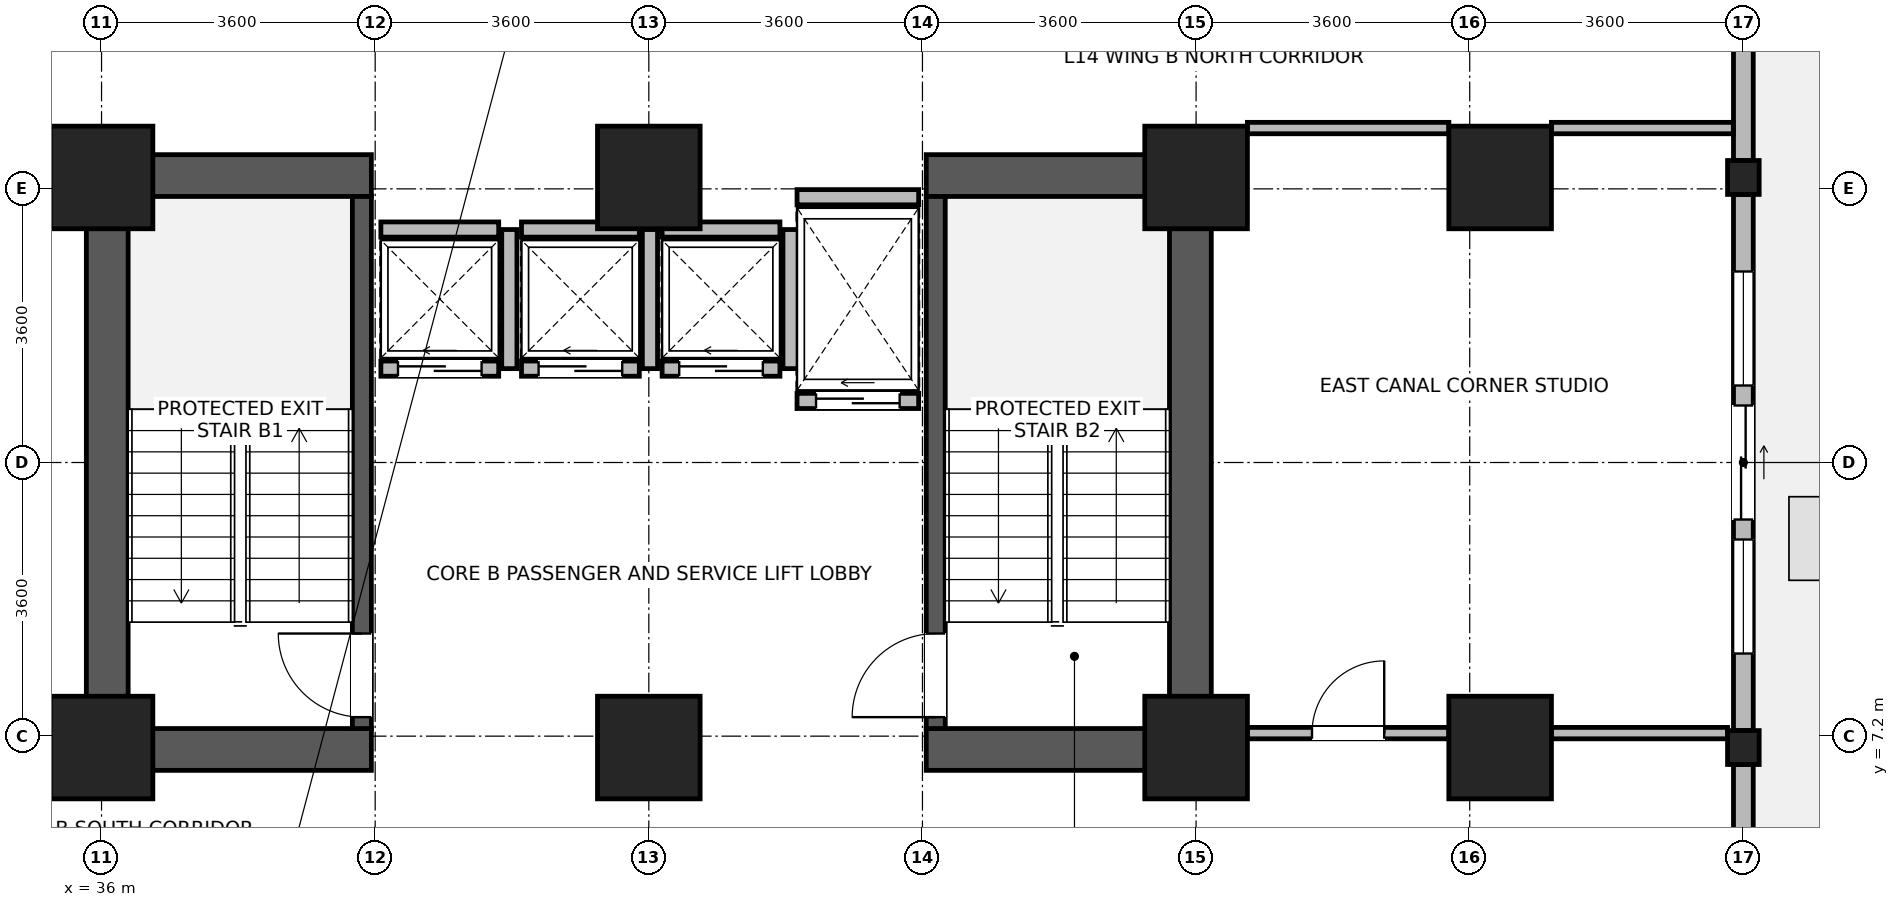
"""IFC4 building model, lengths in metres.
Left out: names, types, materials, properties, quantities, classifications, styles, units other than length and angle.
Written with IfcOpenShell. Run it as: python <this file> out.ifc"""

import sys

from ifc_helpers import new_model, si_unit, direction, frame, frame_2d, origin, origin_2d, place, context, subcontext, project, spatial, rectangle, i_section, extrude, source, transform, mapped, element, fill, save


model = new_model("IFC4")
c1 = context("Model", 3, precision=1e-05, world=origin(), true_north=direction((0.0, 1.0)))
c2 = subcontext(c1, "Body", "Model", "MODEL_VIEW")
j1 = project(units=[si_unit("LENGTHUNIT", "METRE"), si_unit("PLANEANGLEUNIT", "RADIAN")], contexts=[c1])
p1 = place(None, origin())
s1 = spatial("IfcSite", under=j1, at=p1, CompositionType="ELEMENT")
p2 = place(p1, origin())
s2 = spatial("IfcBuilding", under=s1, at=p2, CompositionType="ELEMENT")
p3 = place(p2, frame((0.0, 0.0, 58.6)))
s3 = spatial("IfcBuildingStorey", under=s2, at=p3, CompositionType="ELEMENT", Elevation=58.6)
for number, where, z_axis, x_axis in (
    (1, (36.075, 6.75, 0.0), (0.0, 0.0, 1.0), (0.0, 1.0, 0.0)),
    (2, (50.325, 6.75, 0.0), (0.0, 0.0, 1.0), (0.0, 1.0, 0.0)),
):
    element("IfcWall", number, at=place(p3, frame(where, z_axis=z_axis, x_axis=x_axis)), inside=s3, PredefinedType="SHEAR", context=c2, shape_type="SweptSolid", body=[
        extrude(rectangle(XDim=8.1, YDim=0.55, at=frame_2d((4.05, 0.0))), origin(), (0.0, 0.0, 1.0), 3.45),
    ])
for number, where, z_axis, x_axis in (
    (3, (36.35, 7.025, 0.0), (0.0, 0.0, 1.0), (1.0, 0.0, 0.0)),
    (4, (46.85, 7.025, 0.0), (0.0, 0.0, 1.0), (1.0, 0.0, 0.0)),
    (5, (36.35, 14.575, 0.0), (0.0, 0.0, 1.0), (1.0, 0.0, 0.0)),
    (6, (46.85, 14.575, 0.0), (0.0, 0.0, 1.0), (1.0, 0.0, 0.0)),
):
    element("IfcWall", number, at=place(p3, frame(where, z_axis=z_axis, x_axis=x_axis)), inside=s3, PredefinedType="SHEAR", context=c2, shape_type="SweptSolid", body=[
        extrude(rectangle(XDim=3.2, YDim=0.55, at=frame_2d((1.6, 0.0))), origin(), (0.0, 0.0, 1.0), 3.45),
    ])
p4 = place(p3, frame((39.425, 7.3, 0.0), z_axis=(0.0, 0.0, 1.0), x_axis=(0.0, 1.0, 0.0)))
e7 = element("IfcWall", 7, at=p4, inside=s3, PredefinedType="SHEAR", context=c2, shape_type="SweptSolid", body=[
    extrude(rectangle(XDim=7.0, YDim=0.25, at=frame_2d((3.5, 0.0))), origin(), (0.0, 0.0, 1.0), 3.45),
])
p5 = place(p4, frame((0.15, 0.0, 0.0)))
e8 = element("IfcOpeningElement", 8, at=p5, cuts=e7, PredefinedType="OPENING", context=c2, shape_type="SweptSolid", body=[
    extrude(rectangle(XDim=1.1, YDim=2.08, at=frame_2d((0.55, 1.04))), frame((0.0, 0.135, 0.0), z_axis=(0.0, -1.0, 0.0), x_axis=(1.0, 0.0, 0.0)), (0.0, 0.0, 1.0), 0.27),
])
p6 = place(p3, frame((46.975, 7.3, 0.0), z_axis=(0.0, 0.0, 1.0), x_axis=(0.0, 1.0, 0.0)))
e9 = element("IfcWall", 9, at=p6, inside=s3, PredefinedType="SHEAR", context=c2, shape_type="SweptSolid", body=[
    extrude(rectangle(XDim=7.0, YDim=0.25, at=frame_2d((3.5, 0.0))), origin(), (0.0, 0.0, 1.0), 3.45),
])
p7 = place(p6, frame((0.15, 0.0, 0.0)))
e10 = element("IfcOpeningElement", 10, at=p7, cuts=e9, PredefinedType="OPENING", context=c2, shape_type="SweptSolid", body=[
    extrude(rectangle(XDim=1.1, YDim=2.08, at=frame_2d((0.55, 1.04))), frame((0.0, 0.135, 0.0), z_axis=(0.0, -1.0, 0.0), x_axis=(1.0, 0.0, 0.0)), (0.0, 0.0, 1.0), 0.27),
])
m1 = source(origin(), c2, "Body", "SweptSolid", [
    extrude(rectangle(XDim=1.35, YDim=1.35, at=origin_2d()), origin(), (0.0, 0.0, 1.0), 3.7),
])
for number, where, z_axis, x_axis in (
    (11, (36.0, 7.05, 0.0), (0.0, 0.0, 1.0), (1.0, 0.0, 0.0)),
    (12, (36.0, 14.55, 0.0), (0.0, 0.0, 1.0), (1.0, 0.0, 0.0)),
    (13, (43.2, 7.05, 0.0), (0.0, 0.0, 1.0), (1.0, 0.0, 0.0)),
    (14, (43.2, 14.55, 0.0), (0.0, 0.0, 1.0), (1.0, 0.0, 0.0)),
    (15, (50.4, 7.05, 0.0), (0.0, 0.0, 1.0), (1.0, 0.0, 0.0)),
    (16, (50.4, 14.55, 0.0), (0.0, 0.0, 1.0), (1.0, 0.0, 0.0)),
    (17, (54.4, 7.05, 0.0), (0.0, 0.0, 1.0), (1.0, 0.0, 0.0)),
    (18, (54.4, 14.55, 0.0), (0.0, 0.0, 1.0), (1.0, 0.0, 0.0)),
):
    element("IfcColumn", number, at=place(p3, frame(where, z_axis=z_axis, x_axis=x_axis)), inside=s3, PredefinedType="COLUMN", context=c2, shape_type="MappedRepresentation", body=[
        mapped(m1, transform((0.0, 0.0, 0.0), x_axis=(1.0, 0.0, 0.0), y_axis=(0.0, 1.0, 0.0), z_axis=(0.0, 0.0, 1.0), scale=1.0)),
    ])
m2 = source(origin(), c2, "Body", "SweptSolid", [
    extrude(i_section(OverallWidth=0.416, OverallDepth=0.446, WebThickness=0.029, FlangeThickness=0.04, FilletRadius=0.015, at=origin_2d()), origin(), (0.0, 0.0, 1.0), 3.7),
])
for number, where, z_axis, x_axis in (
    (19, (57.6, 7.05, 0.0), (0.0, 0.0, 1.0), (1.0, 0.0, 0.0)),
    (20, (57.6, 14.55, 0.0), (0.0, 0.0, 1.0), (1.0, 0.0, 0.0)),
):
    element("IfcColumn", number, at=place(p3, frame(where, z_axis=z_axis, x_axis=x_axis)), inside=s3, PredefinedType="COLUMN", context=c2, shape_type="MappedRepresentation", body=[
        mapped(m2, transform((0.0, 0.0, 0.0), x_axis=(1.0, 0.0, 0.0), y_axis=(0.0, 1.0, 0.0), z_axis=(0.0, 0.0, 1.0), scale=1.0)),
    ])
p8 = place(p3, frame((57.6, 6.826, 0.0), z_axis=(0.0, 0.0, 1.0), x_axis=(0.0, -1.0, 0.0)))
e21 = element("IfcWall", 21, at=p8, inside=s3, PredefinedType="STANDARD", context=c2, shape_type="SweptSolid", body=[
    extrude(rectangle(XDim=2.156, YDim=0.26, at=frame_2d((1.078, 0.0))), origin(), (0.0, 0.0, 1.0), 3.43),
])
p9 = place(p3, frame((57.6, 14.326, 0.0), z_axis=(0.0, 0.0, 1.0), x_axis=(0.0, -1.0, 0.0)))
e22 = element("IfcWall", 22, at=p9, inside=s3, PredefinedType="STANDARD", context=c2, shape_type="SweptSolid", body=[
    extrude(rectangle(XDim=7.052, YDim=0.26, at=frame_2d((3.526, 0.0))), origin(), (0.0, 0.0, 1.0), 2.93),
])
p10 = place(p9, frame((2.776, 0.0, 0.0)))
e23 = element("IfcOpeningElement", 23, at=p10, cuts=e22, PredefinedType="OPENING", context=c2, shape_type="SweptSolid", body=[
    extrude(rectangle(XDim=1.5, YDim=2.15, at=frame_2d((0.75, 1.075))), frame((0.0, 0.14, 0.0), z_axis=(0.0, -1.0, 0.0), x_axis=(1.0, 0.0, 0.0)), (0.0, 0.0, 1.0), 0.28),
])
p11 = place(p9, frame((1.013, 0.0, 0.85)))
e24 = element("IfcOpeningElement", 24, at=p11, cuts=e22, PredefinedType="OPENING", context=c2, shape_type="SweptSolid", body=[
    extrude(rectangle(XDim=1.5, YDim=1.85, at=frame_2d((0.75, 0.925))), frame((0.0, 0.14, 0.0), z_axis=(0.0, -1.0, 0.0), x_axis=(1.0, 0.0, 0.0)), (0.0, 0.0, 1.0), 0.28),
])
p12 = place(p9, frame((4.539, 0.0, 0.85)))
e25 = element("IfcOpeningElement", 25, at=p12, cuts=e22, PredefinedType="OPENING", context=c2, shape_type="SweptSolid", body=[
    extrude(rectangle(XDim=1.5, YDim=1.85, at=frame_2d((0.75, 0.925))), frame((0.0, 0.14, 0.0), z_axis=(0.0, -1.0, 0.0), x_axis=(1.0, 0.0, 0.0)), (0.0, 0.0, 1.0), 0.28),
])
p13 = place(p3, frame((57.6, 21.376, 0.0), z_axis=(0.0, 0.0, 1.0), x_axis=(0.0, -1.0, 0.0)))
e26 = element("IfcWall", 26, at=p13, inside=s3, PredefinedType="STANDARD", context=c2, shape_type="SweptSolid", body=[
    extrude(rectangle(XDim=6.602, YDim=0.26, at=frame_2d((3.301, 0.0))), origin(), (0.0, 0.0, 1.0), 2.93),
])
p14 = place(p13, frame((0.9, 0.0, 0.85)))
e27 = element("IfcOpeningElement", 27, at=p14, cuts=e26, PredefinedType="OPENING", context=c2, shape_type="SweptSolid", body=[
    extrude(rectangle(XDim=1.5, YDim=1.85, at=frame_2d((0.75, 0.925))), frame((0.0, 0.14, 0.0), z_axis=(0.0, -1.0, 0.0), x_axis=(1.0, 0.0, 0.0)), (0.0, 0.0, 1.0), 0.28),
])
p15 = place(p13, frame((2.826, 0.0, 0.85)))
e28 = element("IfcOpeningElement", 28, at=p15, cuts=e26, PredefinedType="OPENING", context=c2, shape_type="SweptSolid", body=[
    extrude(rectangle(XDim=0.95, YDim=1.75, at=frame_2d((0.475, 0.875))), frame((0.0, 0.14, 0.0), z_axis=(0.0, -1.0, 0.0), x_axis=(1.0, 0.0, 0.0)), (0.0, 0.0, 1.0), 0.28),
])
p16 = place(p3, frame((39.675, 12.035, 0.0), z_axis=(0.0, 0.0, 1.0), x_axis=(1.0, 0.0, 0.0)))
e29 = element("IfcWall", 29, at=p16, inside=s3, PredefinedType="PARTITIONING", context=c2, shape_type="SweptSolid", body=[
    extrude(rectangle(XDim=1.55, YDim=0.2, at=frame_2d((0.775, 0.0))), origin(), (0.0, 0.0, 1.0), 3.43),
])
p17 = place(p16, frame((0.225, 0.0, 0.0)))
e30 = element("IfcOpeningElement", 30, at=p17, cuts=e29, PredefinedType="OPENING", context=c2, shape_type="SweptSolid", body=[
    extrude(rectangle(XDim=1.1, YDim=2.12, at=frame_2d((0.55, 1.06))), frame((0.0, 0.11, 0.0), z_axis=(0.0, -1.0, 0.0), x_axis=(1.0, 0.0, 0.0)), (0.0, 0.0, 1.0), 0.22),
])
p18 = place(p3, frame((39.675, 13.865, 0.0), z_axis=(0.0, 0.0, 1.0), x_axis=(1.0, 0.0, 0.0)))
e31 = element("IfcWall", 31, at=p18, inside=s3, PredefinedType="PARTITIONING", context=c2, shape_type="SweptSolid", body=[
    extrude(rectangle(XDim=1.55, YDim=0.2, at=frame_2d((0.775, 0.0))), origin(), (0.0, 0.0, 1.0), 3.43),
])
p19 = place(p3, frame((41.365, 12.035, 0.0), z_axis=(0.0, 0.0, 1.0), x_axis=(0.0, 1.0, 0.0)))
e32 = element("IfcWall", 32, at=p19, inside=s3, PredefinedType="PARTITIONING", context=c2, shape_type="SweptSolid", body=[
    extrude(rectangle(XDim=1.83, YDim=0.2, at=frame_2d((0.915, 0.0))), origin(), (0.0, 0.0, 1.0), 3.43),
])
p20 = place(p3, frame((41.525, 12.035, 0.0), z_axis=(0.0, 0.0, 1.0), x_axis=(1.0, 0.0, 0.0)))
e33 = element("IfcWall", 33, at=p20, inside=s3, PredefinedType="PARTITIONING", context=c2, shape_type="SweptSolid", body=[
    extrude(rectangle(XDim=1.55, YDim=0.2, at=frame_2d((0.775, 0.0))), origin(), (0.0, 0.0, 1.0), 3.43),
])
p21 = place(p20, frame((0.225, 0.0, 0.0)))
e34 = element("IfcOpeningElement", 34, at=p21, cuts=e33, PredefinedType="OPENING", context=c2, shape_type="SweptSolid", body=[
    extrude(rectangle(XDim=1.1, YDim=2.12, at=frame_2d((0.55, 1.06))), frame((0.0, 0.11, 0.0), z_axis=(0.0, -1.0, 0.0), x_axis=(1.0, 0.0, 0.0)), (0.0, 0.0, 1.0), 0.22),
])
p22 = place(p3, frame((41.525, 13.865, 0.0), z_axis=(0.0, 0.0, 1.0), x_axis=(1.0, 0.0, 0.0)))
e35 = element("IfcWall", 35, at=p22, inside=s3, PredefinedType="PARTITIONING", context=c2, shape_type="SweptSolid", body=[
    extrude(rectangle(XDim=1.55, YDim=0.2, at=frame_2d((0.775, 0.0))), origin(), (0.0, 0.0, 1.0), 3.43),
])
p23 = place(p3, frame((43.215, 12.035, 0.0), z_axis=(0.0, 0.0, 1.0), x_axis=(0.0, 1.0, 0.0)))
e36 = element("IfcWall", 36, at=p23, inside=s3, PredefinedType="PARTITIONING", context=c2, shape_type="SweptSolid", body=[
    extrude(rectangle(XDim=1.83, YDim=0.2, at=frame_2d((0.915, 0.0))), origin(), (0.0, 0.0, 1.0), 3.43),
])
p24 = place(p3, frame((43.375, 12.035, 0.0), z_axis=(0.0, 0.0, 1.0), x_axis=(1.0, 0.0, 0.0)))
e37 = element("IfcWall", 37, at=p24, inside=s3, PredefinedType="PARTITIONING", context=c2, shape_type="SweptSolid", body=[
    extrude(rectangle(XDim=1.55, YDim=0.2, at=frame_2d((0.775, 0.0))), origin(), (0.0, 0.0, 1.0), 3.43),
])
p25 = place(p24, frame((0.225, 0.0, 0.0)))
e38 = element("IfcOpeningElement", 38, at=p25, cuts=e37, PredefinedType="OPENING", context=c2, shape_type="SweptSolid", body=[
    extrude(rectangle(XDim=1.1, YDim=2.12, at=frame_2d((0.55, 1.06))), frame((0.0, 0.11, 0.0), z_axis=(0.0, -1.0, 0.0), x_axis=(1.0, 0.0, 0.0)), (0.0, 0.0, 1.0), 0.22),
])
p26 = place(p3, frame((43.375, 13.865, 0.0), z_axis=(0.0, 0.0, 1.0), x_axis=(1.0, 0.0, 0.0)))
e39 = element("IfcWall", 39, at=p26, inside=s3, PredefinedType="PARTITIONING", context=c2, shape_type="SweptSolid", body=[
    extrude(rectangle(XDim=1.55, YDim=0.2, at=frame_2d((0.775, 0.0))), origin(), (0.0, 0.0, 1.0), 3.43),
])
p27 = place(p3, frame((45.065, 12.035, 0.0), z_axis=(0.0, 0.0, 1.0), x_axis=(0.0, 1.0, 0.0)))
e40 = element("IfcWall", 40, at=p27, inside=s3, PredefinedType="PARTITIONING", context=c2, shape_type="SweptSolid", body=[
    extrude(rectangle(XDim=1.83, YDim=0.2, at=frame_2d((0.915, 0.0))), origin(), (0.0, 0.0, 1.0), 3.43),
])
p28 = place(p3, frame((45.15, 11.61, 0.0), z_axis=(0.0, 0.0, 1.0), x_axis=(1.0, 0.0, 0.0)))
e41 = element("IfcWall", 41, at=p28, inside=s3, PredefinedType="PARTITIONING", context=c2, shape_type="SweptSolid", body=[
    extrude(rectangle(XDim=1.6, YDim=0.2, at=frame_2d((0.8, 0.0))), origin(), (0.0, 0.0, 1.0), 3.43),
])
p29 = place(p28, frame((0.25, 0.0, 0.0)))
e42 = element("IfcOpeningElement", 42, at=p29, cuts=e41, PredefinedType="OPENING", context=c2, shape_type="SweptSolid", body=[
    extrude(rectangle(XDim=1.1, YDim=2.12, at=frame_2d((0.55, 1.06))), frame((0.0, 0.11, 0.0), z_axis=(0.0, -1.0, 0.0), x_axis=(1.0, 0.0, 0.0)), (0.0, 0.0, 1.0), 0.22),
])
p30 = place(p3, frame((45.15, 14.29, 0.0), z_axis=(0.0, 0.0, 1.0), x_axis=(1.0, 0.0, 0.0)))
e43 = element("IfcWall", 43, at=p30, inside=s3, PredefinedType="PARTITIONING", context=c2, shape_type="SweptSolid", body=[
    extrude(rectangle(XDim=1.6, YDim=0.2, at=frame_2d((0.8, 0.0))), origin(), (0.0, 0.0, 1.0), 2.23),
])
p31 = place(p3, frame((51.075, 7.24, 0.0), z_axis=(0.0, 0.0, 1.0), x_axis=(1.0, 0.0, 0.0)))
e44 = element("IfcWall", 44, at=p31, inside=s3, PredefinedType="PARTITIONING", context=c2, shape_type="SweptSolid", body=[
    extrude(rectangle(XDim=2.65, YDim=0.15, at=frame_2d((1.325, 0.0))), origin(), (0.0, 0.0, 1.0), 2.78),
])
p32 = place(p31, frame((0.85, 0.0, 0.0)))
e45 = element("IfcOpeningElement", 45, at=p32, cuts=e44, PredefinedType="OPENING", context=c2, shape_type="SweptSolid", body=[
    extrude(rectangle(XDim=0.95, YDim=2.1, at=frame_2d((0.475, 1.05))), frame((0.0, 0.085, 0.0), z_axis=(0.0, -1.0, 0.0), x_axis=(1.0, 0.0, 0.0)), (0.0, 0.0, 1.0), 0.17),
])
p33 = place(p3, frame((55.075, 7.24, 0.0), z_axis=(0.0, 0.0, 1.0), x_axis=(1.0, 0.0, 0.0)))
e46 = element("IfcWall", 46, at=p33, inside=s3, PredefinedType="PARTITIONING", context=c2, shape_type="SweptSolid", body=[
    extrude(rectangle(XDim=2.317, YDim=0.15, at=frame_2d((1.159, 0.0))), origin(), (0.0, 0.0, 1.0), 2.78),
])
p34 = place(p3, frame((51.075, 15.2, 0.0), z_axis=(0.0, 0.0, 1.0), x_axis=(1.0, 0.0, 0.0)))
e47 = element("IfcWall", 47, at=p34, inside=s3, PredefinedType="PARTITIONING", context=c2, shape_type="SweptSolid", body=[
    extrude(rectangle(XDim=2.65, YDim=0.15, at=frame_2d((1.325, 0.0))), origin(), (0.0, 0.0, 1.0), 3.43),
])
p35 = place(p3, frame((55.075, 15.2, 0.0), z_axis=(0.0, 0.0, 1.0), x_axis=(1.0, 0.0, 0.0)))
e48 = element("IfcWall", 48, at=p35, inside=s3, PredefinedType="PARTITIONING", context=c2, shape_type="SweptSolid", body=[
    extrude(rectangle(XDim=2.393, YDim=0.15, at=frame_2d((1.197, 0.0))), origin(), (0.0, 0.0, 1.0), 3.43),
])
p36 = place(p10, origin())
e49 = element("IfcDoor", 49, at=p36, inside=s3, OperationType="SLIDING_TO_LEFT", PredefinedType="DOOR", context=c2, shape_type="SweptSolid", body=[
    extrude(rectangle(XDim=1.5, YDim=2.15, at=frame_2d((0.75, 1.075))), frame((0.0, 0.025, 0.0), z_axis=(0.0, -1.0, 0.0), x_axis=(1.0, 0.0, 0.0)), (0.0, 0.0, 1.0), 0.05),
])
fill(e23, e49)
p37 = place(p11, origin())
e50 = element("IfcWindow", 50, at=p37, inside=s3, PartitioningType="SINGLE_PANEL", PredefinedType="WINDOW", context=c2, shape_type="SweptSolid", body=[
    extrude(rectangle(XDim=1.5, YDim=1.85, at=frame_2d((0.75, 0.925))), frame((0.0, 0.03, 0.0), z_axis=(0.0, -1.0, 0.0), x_axis=(1.0, 0.0, 0.0)), (0.0, 0.0, 1.0), 0.06),
])
fill(e24, e50)
p38 = place(p12, origin())
e51 = element("IfcWindow", 51, at=p38, inside=s3, PartitioningType="SINGLE_PANEL", PredefinedType="WINDOW", context=c2, shape_type="SweptSolid", body=[
    extrude(rectangle(XDim=1.5, YDim=1.85, at=frame_2d((0.75, 0.925))), frame((0.0, 0.03, 0.0), z_axis=(0.0, -1.0, 0.0), x_axis=(1.0, 0.0, 0.0)), (0.0, 0.0, 1.0), 0.06),
])
fill(e25, e51)
p39 = place(p5, origin())
e52 = element("IfcDoor", 52, at=p39, inside=s3, OperationType="SINGLE_SWING_RIGHT", PredefinedType="DOOR", context=c2, shape_type="SweptSolid", body=[
    extrude(rectangle(XDim=1.1, YDim=2.08, at=frame_2d((0.55, 1.04))), frame((0.0, 0.025, 0.0), z_axis=(0.0, -1.0, 0.0), x_axis=(1.0, 0.0, 0.0)), (0.0, 0.0, 1.0), 0.05),
])
fill(e8, e52)
p40 = place(p7, origin())
e53 = element("IfcDoor", 53, at=p40, inside=s3, OperationType="SINGLE_SWING_LEFT", PredefinedType="DOOR", context=c2, shape_type="SweptSolid", body=[
    extrude(rectangle(XDim=1.1, YDim=2.08, at=frame_2d((0.55, 1.04))), frame((0.0, 0.025, 0.0), z_axis=(0.0, -1.0, 0.0), x_axis=(1.0, 0.0, 0.0)), (0.0, 0.0, 1.0), 0.05),
])
fill(e10, e53)
p41 = place(p17, origin())
e54 = element("IfcDoor", 54, at=p41, inside=s3, OperationType="SLIDING_TO_LEFT", PredefinedType="DOOR", context=c2, shape_type="SweptSolid", body=[
    extrude(rectangle(XDim=1.1, YDim=2.12, at=frame_2d((0.55, 1.06))), frame((0.0, 0.025, 0.0), z_axis=(0.0, -1.0, 0.0), x_axis=(1.0, 0.0, 0.0)), (0.0, 0.0, 1.0), 0.05),
])
fill(e30, e54)
p42 = place(p21, origin())
e55 = element("IfcDoor", 55, at=p42, inside=s3, OperationType="SLIDING_TO_LEFT", PredefinedType="DOOR", context=c2, shape_type="SweptSolid", body=[
    extrude(rectangle(XDim=1.1, YDim=2.12, at=frame_2d((0.55, 1.06))), frame((0.0, 0.025, 0.0), z_axis=(0.0, -1.0, 0.0), x_axis=(1.0, 0.0, 0.0)), (0.0, 0.0, 1.0), 0.05),
])
fill(e34, e55)
p43 = place(p25, origin())
e56 = element("IfcDoor", 56, at=p43, inside=s3, OperationType="SLIDING_TO_LEFT", PredefinedType="DOOR", context=c2, shape_type="SweptSolid", body=[
    extrude(rectangle(XDim=1.1, YDim=2.12, at=frame_2d((0.55, 1.06))), frame((0.0, 0.025, 0.0), z_axis=(0.0, -1.0, 0.0), x_axis=(1.0, 0.0, 0.0)), (0.0, 0.0, 1.0), 0.05),
])
fill(e38, e56)
p44 = place(p29, origin())
e57 = element("IfcDoor", 57, at=p44, inside=s3, OperationType="SLIDING_TO_LEFT", PredefinedType="DOOR", context=c2, shape_type="SweptSolid", body=[
    extrude(rectangle(XDim=1.1, YDim=2.12, at=frame_2d((0.55, 1.06))), frame((0.0, 0.025, 0.0), z_axis=(0.0, -1.0, 0.0), x_axis=(1.0, 0.0, 0.0)), (0.0, 0.0, 1.0), 0.05),
])
fill(e42, e57)
p45 = place(p32, origin())
e58 = element("IfcDoor", 58, at=p45, inside=s3, OperationType="SINGLE_SWING_RIGHT", PredefinedType="DOOR", context=c2, shape_type="SweptSolid", body=[
    extrude(rectangle(XDim=0.95, YDim=2.1, at=frame_2d((0.475, 1.05))), frame((0.0, 0.025, 0.0), z_axis=(0.0, -1.0, 0.0), x_axis=(1.0, 0.0, 0.0)), (0.0, 0.0, 1.0), 0.05),
])
fill(e45, e58)
save(model, sys.argv[1])
